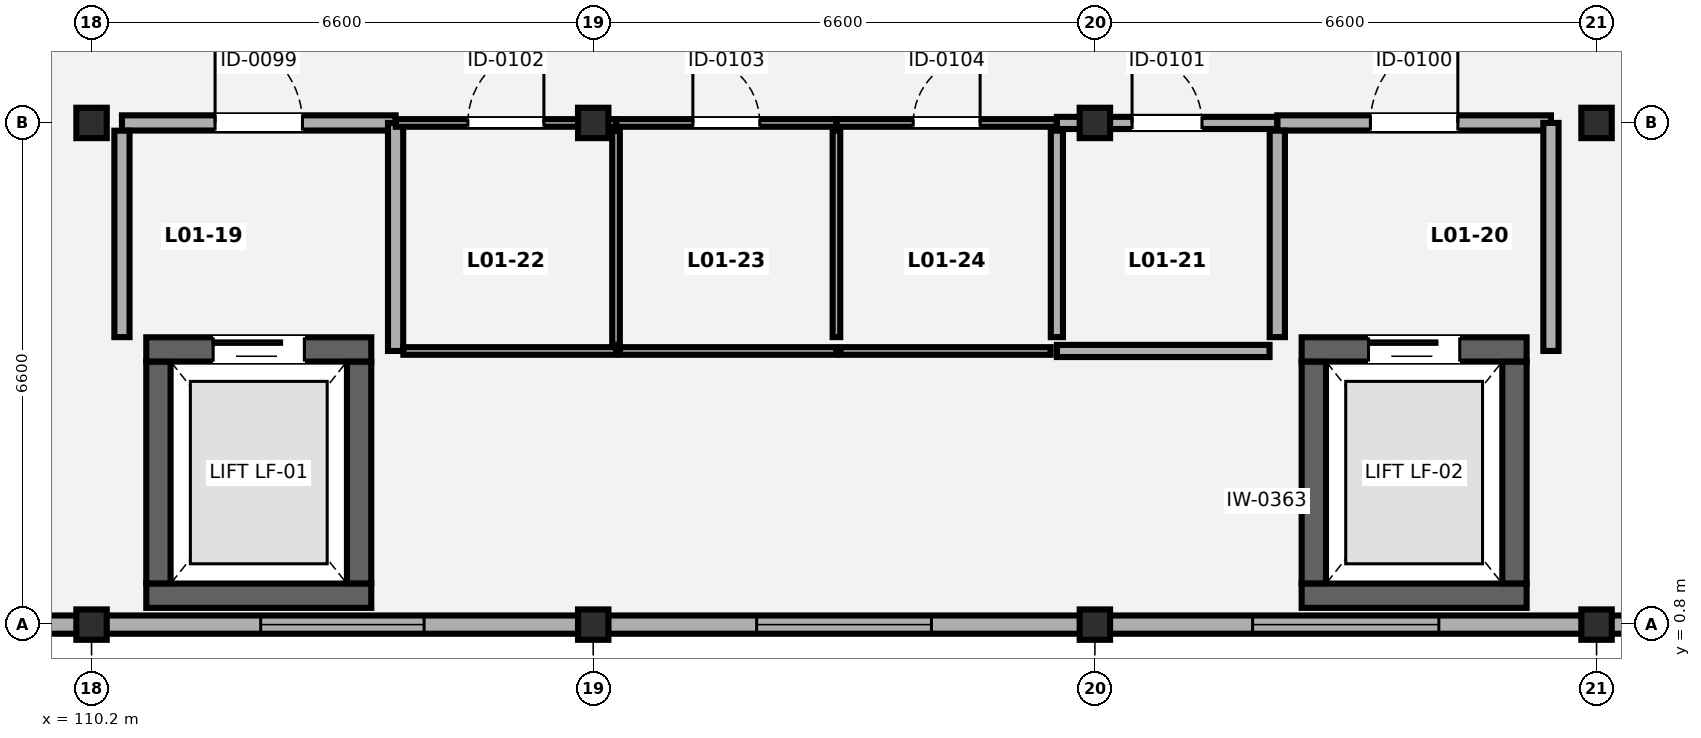
"""IFC4 building model, lengths in metres.
Left out: names, types, materials, properties, quantities, classifications, styles, units other than length and angle.
Written with IfcOpenShell. Run it as: python <this file> out.ifc"""

import sys

from ifc_helpers import new_model, si_unit, direction, frame, frame_2d, origin, origin_2d, place, context, subcontext, project, spatial, rectangle, i_section, extrude, element, fill, save


model = new_model("IFC4")
c1 = context("Model", 3, precision=1e-05, world=origin(), true_north=direction((0.0, 1.0)))
c2 = subcontext(c1, "Body", "Model", "MODEL_VIEW")
j1 = project(units=[si_unit("LENGTHUNIT", "METRE"), si_unit("PLANEANGLEUNIT", "RADIAN")], contexts=[c1])
p1 = place(None, origin())
s1 = spatial("IfcSite", under=j1, at=p1, CompositionType="ELEMENT")
p2 = place(p1, origin())
s2 = spatial("IfcBuilding", under=s1, at=p2, CompositionType="ELEMENT")
p3 = place(p2, frame((0.0, 0.0, 4.9)))
s3 = spatial("IfcBuildingStorey", under=s2, at=p3, CompositionType="ELEMENT", Elevation=4.9)
for number, where, z_axis, x_axis in (
    (1, (110.2, 0.8, 0.0), (0.0, 0.0, 1.0), (1.0, 0.0, 0.0)),
    (2, (110.2, 7.4, 0.0), (0.0, 0.0, 1.0), (1.0, 0.0, 0.0)),
    (3, (116.8, 0.8, 0.0), (0.0, 0.0, 1.0), (1.0, 0.0, 0.0)),
    (4, (116.8, 7.4, 0.0), (0.0, 0.0, 1.0), (1.0, 0.0, 0.0)),
    (5, (123.4, 0.8, 0.0), (0.0, 0.0, 1.0), (1.0, 0.0, 0.0)),
    (6, (123.4, 7.4, 0.0), (0.0, 0.0, 1.0), (1.0, 0.0, 0.0)),
    (7, (130.0, 0.8, 0.0), (0.0, 0.0, 1.0), (1.0, 0.0, 0.0)),
    (8, (130.0, 7.4, 0.0), (0.0, 0.0, 1.0), (1.0, 0.0, 0.0)),
):
    element("IfcColumn", number, at=place(p3, frame(where, z_axis=z_axis, x_axis=x_axis)), inside=s3, PredefinedType="COLUMN", context=c2, shape_type="SweptSolid", body=[
        extrude(i_section(OverallWidth=0.4, OverallDepth=0.4, WebThickness=0.02, FlangeThickness=0.035, FilletRadius=0.016, at=origin_2d()), origin(), (0.0, 0.0, 1.0), 4.2),
    ])
p4 = place(p3, frame((162.002, 0.8, 0.0), z_axis=(0.0, 0.0, 1.0), x_axis=(-1.0, 0.0, 0.0)))
e9 = element("IfcWall", 9, at=p4, inside=s3, PredefinedType="SOLIDWALL", context=c2, shape_type="SweptSolid", body=[
    extrude(rectangle(XDim=58.204, YDim=0.24, at=frame_2d((29.102, 0.0))), origin(), (0.0, 0.0, 1.0), 3.505),
])
p5 = place(p4, frame((54.102, 0.0, 0.85)))
e10 = element("IfcOpeningElement", 10, at=p5, cuts=e9, PredefinedType="OPENING", context=c2, shape_type="SweptSolid", body=[
    extrude(rectangle(XDim=2.0, YDim=1.4, at=frame_2d((1.0, 0.7))), frame((0.0, 0.13, 0.0), z_axis=(0.0, -1.0, 0.0), x_axis=(1.0, 0.0, 0.0)), (0.0, 0.0, 1.0), 0.26),
])
p6 = place(p4, frame((47.427, 0.0, 0.85)))
e11 = element("IfcOpeningElement", 11, at=p6, cuts=e9, PredefinedType="OPENING", context=c2, shape_type="SweptSolid", body=[
    extrude(rectangle(XDim=2.15, YDim=1.4, at=frame_2d((1.075, 0.7))), frame((0.0, 0.13, 0.0), z_axis=(0.0, -1.0, 0.0), x_axis=(1.0, 0.0, 0.0)), (0.0, 0.0, 1.0), 0.26),
])
p7 = place(p4, frame((40.752, 0.0, 0.85)))
e12 = element("IfcOpeningElement", 12, at=p7, cuts=e9, PredefinedType="OPENING", context=c2, shape_type="SweptSolid", body=[
    extrude(rectangle(XDim=2.3, YDim=1.4, at=frame_2d((1.15, 0.7))), frame((0.0, 0.13, 0.0), z_axis=(0.0, -1.0, 0.0), x_axis=(1.0, 0.0, 0.0)), (0.0, 0.0, 1.0), 0.26),
])
p8 = place(p4, frame((34.077, 0.0, 0.85)))
e13 = element("IfcOpeningElement", 13, at=p8, cuts=e9, PredefinedType="OPENING", context=c2, shape_type="SweptSolid", body=[
    extrude(rectangle(XDim=2.45, YDim=1.4, at=frame_2d((1.225, 0.7))), frame((0.0, 0.13, 0.0), z_axis=(0.0, -1.0, 0.0), x_axis=(1.0, 0.0, 0.0)), (0.0, 0.0, 1.0), 0.26),
])
p9 = place(p4, frame((28.102, 0.0, 0.85)))
e14 = element("IfcOpeningElement", 14, at=p9, cuts=e9, PredefinedType="OPENING", context=c2, shape_type="SweptSolid", body=[
    extrude(rectangle(XDim=1.2, YDim=1.25, at=frame_2d((0.6, 0.625))), frame((0.0, 0.13, 0.0), z_axis=(0.0, -1.0, 0.0), x_axis=(1.0, 0.0, 0.0)), (0.0, 0.0, 1.0), 0.26),
])
p10 = place(p4, frame((21.377, 0.0, 0.85)))
e15 = element("IfcOpeningElement", 15, at=p10, cuts=e9, PredefinedType="OPENING", context=c2, shape_type="SweptSolid", body=[
    extrude(rectangle(XDim=1.45, YDim=1.25, at=frame_2d((0.725, 0.625))), frame((0.0, 0.13, 0.0), z_axis=(0.0, -1.0, 0.0), x_axis=(1.0, 0.0, 0.0)), (0.0, 0.0, 1.0), 0.26),
])
p11 = place(p4, frame((14.677, 0.0, 0.85)))
e16 = element("IfcOpeningElement", 16, at=p11, cuts=e9, PredefinedType="OPENING", context=c2, shape_type="SweptSolid", body=[
    extrude(rectangle(XDim=1.65, YDim=1.25, at=frame_2d((0.825, 0.625))), frame((0.0, 0.13, 0.0), z_axis=(0.0, -1.0, 0.0), x_axis=(1.0, 0.0, 0.0)), (0.0, 0.0, 1.0), 0.26),
])
p12 = place(p4, frame((7.952, 0.0, 0.85)))
e17 = element("IfcOpeningElement", 17, at=p12, cuts=e9, PredefinedType="OPENING", context=c2, shape_type="SweptSolid", body=[
    extrude(rectangle(XDim=1.9, YDim=1.25, at=frame_2d((0.95, 0.625))), frame((0.0, 0.13, 0.0), z_axis=(0.0, -1.0, 0.0), x_axis=(1.0, 0.0, 0.0)), (0.0, 0.0, 1.0), 0.26),
])
p13 = place(p4, frame((1.602, 0.0, 0.85)))
e18 = element("IfcOpeningElement", 18, at=p13, cuts=e9, PredefinedType="OPENING", context=c2, shape_type="SweptSolid", body=[
    extrude(rectangle(XDim=2.2, YDim=1.25, at=frame_2d((1.1, 0.625))), frame((0.0, 0.13, 0.0), z_axis=(0.0, -1.0, 0.0), x_axis=(1.0, 0.0, 0.0)), (0.0, 0.0, 1.0), 0.26),
])
p14 = place(p3, frame((110.92, 1.18, 0.0), z_axis=(0.0, 0.0, 1.0), x_axis=(1.0, 0.0, 0.0)))
e19 = element("IfcWall", 19, at=p14, inside=s3, PredefinedType="SHEAR", context=c2, shape_type="SweptSolid", body=[
    extrude(rectangle(XDim=2.96, YDim=0.32, at=frame_2d((1.48, 0.0))), origin(), (0.0, 0.0, 1.0), 4.02),
])
p15 = place(p3, frame((110.92, 4.42, 0.0), z_axis=(0.0, 0.0, 1.0), x_axis=(1.0, 0.0, 0.0)))
e20 = element("IfcWall", 20, at=p15, inside=s3, PredefinedType="SHEAR", context=c2, shape_type="SweptSolid", body=[
    extrude(rectangle(XDim=2.96, YDim=0.32, at=frame_2d((1.48, 0.0))), origin(), (0.0, 0.0, 1.0), 4.02),
])
p16 = place(p15, frame((0.88, 0.0, 0.0)))
e21 = element("IfcOpeningElement", 21, at=p16, cuts=e20, PredefinedType="OPENING", context=c2, shape_type="SweptSolid", body=[
    extrude(rectangle(XDim=1.2, YDim=2.2, at=frame_2d((0.6, 1.1))), frame((0.0, 0.17, 0.0), z_axis=(0.0, -1.0, 0.0), x_axis=(1.0, 0.0, 0.0)), (0.0, 0.0, 1.0), 0.34),
])
for number, where, z_axis, x_axis in (
    (22, (111.08, 1.342, 0.0), (0.0, 0.0, 1.0), (0.0, 1.0, 0.0)),
    (23, (113.72, 1.342, 0.0), (0.0, 0.0, 1.0), (0.0, 1.0, 0.0)),
):
    element("IfcWall", number, at=place(p3, frame(where, z_axis=z_axis, x_axis=x_axis)), inside=s3, PredefinedType="SHEAR", context=c2, shape_type="SweptSolid", body=[
        extrude(rectangle(XDim=2.916, YDim=0.32, at=frame_2d((1.458, 0.0))), origin(), (0.0, 0.0, 1.0), 4.02),
    ])
p17 = place(p3, frame((126.12, 1.18, 0.0), z_axis=(0.0, 0.0, 1.0), x_axis=(1.0, 0.0, 0.0)))
e24 = element("IfcWall", 24, at=p17, inside=s3, PredefinedType="SHEAR", context=c2, shape_type="SweptSolid", body=[
    extrude(rectangle(XDim=2.96, YDim=0.32, at=frame_2d((1.48, 0.0))), origin(), (0.0, 0.0, 1.0), 4.02),
])
p18 = place(p3, frame((126.12, 4.42, 0.0), z_axis=(0.0, 0.0, 1.0), x_axis=(1.0, 0.0, 0.0)))
e25 = element("IfcWall", 25, at=p18, inside=s3, PredefinedType="SHEAR", context=c2, shape_type="SweptSolid", body=[
    extrude(rectangle(XDim=2.96, YDim=0.32, at=frame_2d((1.48, 0.0))), origin(), (0.0, 0.0, 1.0), 4.02),
])
p19 = place(p18, frame((0.88, 0.0, 0.0)))
e26 = element("IfcOpeningElement", 26, at=p19, cuts=e25, PredefinedType="OPENING", context=c2, shape_type="SweptSolid", body=[
    extrude(rectangle(XDim=1.2, YDim=2.2, at=frame_2d((0.6, 1.1))), frame((0.0, 0.17, 0.0), z_axis=(0.0, -1.0, 0.0), x_axis=(1.0, 0.0, 0.0)), (0.0, 0.0, 1.0), 0.34),
])
for number, where, z_axis, x_axis in (
    (27, (126.28, 1.342, 0.0), (0.0, 0.0, 1.0), (0.0, 1.0, 0.0)),
    (28, (128.92, 1.342, 0.0), (0.0, 0.0, 1.0), (0.0, 1.0, 0.0)),
):
    element("IfcWall", number, at=place(p3, frame(where, z_axis=z_axis, x_axis=x_axis)), inside=s3, PredefinedType="SHEAR", context=c2, shape_type="SweptSolid", body=[
        extrude(rectangle(XDim=2.916, YDim=0.32, at=frame_2d((1.458, 0.0))), origin(), (0.0, 0.0, 1.0), 4.02),
    ])
p20 = place(p3, frame((110.6, 7.4, 0.0), z_axis=(0.0, 0.0, 1.0), x_axis=(1.0, 0.0, 0.0)))
e29 = element("IfcWall", 29, at=p20, inside=s3, PredefinedType="SOLIDWALL", context=c2, shape_type="SweptSolid", body=[
    extrude(rectangle(XDim=3.6, YDim=0.2, at=frame_2d((1.8, 0.0))), origin(), (0.0, 0.0, 1.0), 3.293),
])
p21 = place(p20, frame((1.225, 0.0, 0.0)))
e30 = element("IfcOpeningElement", 30, at=p21, cuts=e29, PredefinedType="OPENING", context=c2, shape_type="SweptSolid", body=[
    extrude(rectangle(XDim=1.15, YDim=2.15, at=frame_2d((0.575, 1.075))), frame((0.0, 0.11, 0.0), z_axis=(0.0, -1.0, 0.0), x_axis=(1.0, 0.0, 0.0)), (0.0, 0.0, 1.0), 0.22),
])
p22 = place(p3, frame((110.6, 4.582, 0.0), z_axis=(0.0, 0.0, 1.0), x_axis=(0.0, 1.0, 0.0)))
e31 = element("IfcWall", 31, at=p22, inside=s3, PredefinedType="SOLIDWALL", context=c2, shape_type="SweptSolid", body=[
    extrude(rectangle(XDim=2.716, YDim=0.2, at=frame_2d((1.358, 0.0))), origin(), (0.0, 0.0, 1.0), 4.02),
])
p23 = place(p3, frame((114.2, 4.4, 0.0), z_axis=(0.0, 0.0, 1.0), x_axis=(0.0, 1.0, 0.0)))
e32 = element("IfcWall", 32, at=p23, inside=s3, PredefinedType="SOLIDWALL", context=c2, shape_type="SweptSolid", body=[
    extrude(rectangle(XDim=3.0, YDim=0.2, at=frame_2d((1.5, 0.0))), origin(), (0.0, 0.0, 1.0), 4.02),
])
p24 = place(p3, frame((125.8, 7.4, 0.0), z_axis=(0.0, 0.0, 1.0), x_axis=(1.0, 0.0, 0.0)))
e33 = element("IfcWall", 33, at=p24, inside=s3, PredefinedType="SOLIDWALL", context=c2, shape_type="SweptSolid", body=[
    extrude(rectangle(XDim=3.6, YDim=0.2, at=frame_2d((1.8, 0.0))), origin(), (0.0, 0.0, 1.0), 3.293),
])
p25 = place(p24, frame((1.225, 0.0, 0.0)))
e34 = element("IfcOpeningElement", 34, at=p25, cuts=e33, PredefinedType="OPENING", context=c2, shape_type="SweptSolid", body=[
    extrude(rectangle(XDim=1.15, YDim=2.15, at=frame_2d((0.575, 1.075))), frame((0.0, 0.11, 0.0), z_axis=(0.0, -1.0, 0.0), x_axis=(1.0, 0.0, 0.0)), (0.0, 0.0, 1.0), 0.22),
])
p26 = place(p3, frame((125.8, 4.582, 0.0), z_axis=(0.0, 0.0, 1.0), x_axis=(0.0, 1.0, 0.0)))
e35 = element("IfcWall", 35, at=p26, inside=s3, PredefinedType="SOLIDWALL", context=c2, shape_type="SweptSolid", body=[
    extrude(rectangle(XDim=2.716, YDim=0.2, at=frame_2d((1.358, 0.0))), origin(), (0.0, 0.0, 1.0), 4.02),
])
p27 = place(p3, frame((129.4, 4.4, 0.0), z_axis=(0.0, 0.0, 1.0), x_axis=(0.0, 1.0, 0.0)))
e36 = element("IfcWall", 36, at=p27, inside=s3, PredefinedType="SOLIDWALL", context=c2, shape_type="SweptSolid", body=[
    extrude(rectangle(XDim=3.0, YDim=0.2, at=frame_2d((1.5, 0.0))), origin(), (0.0, 0.0, 1.0), 4.02),
])
p28 = place(p3, frame((122.9, 4.4, 0.0), z_axis=(0.0, 0.0, 1.0), x_axis=(1.0, 0.0, 0.0)))
e37 = element("IfcWall", 37, at=p28, inside=s3, PredefinedType="PARTITIONING", context=c2, shape_type="SweptSolid", body=[
    extrude(rectangle(XDim=2.798, YDim=0.16, at=frame_2d((1.399, 0.0))), origin(), (0.0, 0.0, 1.0), 3.546),
])
p29 = place(p3, frame((122.9, 7.4, 0.0), z_axis=(0.0, 0.0, 1.0), x_axis=(1.0, 0.0, 0.0)))
e38 = element("IfcWall", 38, at=p29, inside=s3, PredefinedType="PARTITIONING", context=c2, shape_type="SweptSolid", body=[
    extrude(rectangle(XDim=2.898, YDim=0.16, at=frame_2d((1.449, 0.0))), origin(), (0.0, 0.0, 1.0), 3.293),
])
p30 = place(p29, frame((0.989, 0.0, 0.0)))
e39 = element("IfcOpeningElement", 39, at=p30, cuts=e38, PredefinedType="OPENING", context=c2, shape_type="SweptSolid", body=[
    extrude(rectangle(XDim=0.92, YDim=2.12, at=frame_2d((0.46, 1.06))), frame((0.0, 0.09, 0.0), z_axis=(0.0, -1.0, 0.0), x_axis=(1.0, 0.0, 0.0)), (0.0, 0.0, 1.0), 0.18),
])
p31 = place(p3, frame((122.9, 4.582, 0.0), z_axis=(0.0, 0.0, 1.0), x_axis=(0.0, 1.0, 0.0)))
e40 = element("IfcWall", 40, at=p31, inside=s3, PredefinedType="PARTITIONING", context=c2, shape_type="SweptSolid", body=[
    extrude(rectangle(XDim=2.716, YDim=0.16, at=frame_2d((1.358, 0.0))), origin(), (0.0, 0.0, 1.0), 4.02),
])
p32 = place(p3, frame((114.302, 4.4, 0.0), z_axis=(0.0, 0.0, 1.0), x_axis=(1.0, 0.0, 0.0)))
e41 = element("IfcWall", 41, at=p32, inside=s3, PredefinedType="PARTITIONING", context=c2, shape_type="SweptSolid", body=[
    extrude(rectangle(XDim=2.798, YDim=0.1, at=frame_2d((1.399, 0.0))), origin(), (0.0, 0.0, 1.0), 4.02),
])
p33 = place(p3, frame((114.202, 7.4, 0.0), z_axis=(0.0, 0.0, 1.0), x_axis=(1.0, 0.0, 0.0)))
e42 = element("IfcWall", 42, at=p33, inside=s3, PredefinedType="PARTITIONING", context=c2, shape_type="SweptSolid", body=[
    extrude(rectangle(XDim=2.898, YDim=0.1, at=frame_2d((1.449, 0.0))), origin(), (0.0, 0.0, 1.0), 3.293),
])
p34 = place(p33, frame((0.949, 0.0, 0.0)))
e43 = element("IfcOpeningElement", 43, at=p34, cuts=e42, PredefinedType="OPENING", context=c2, shape_type="SweptSolid", body=[
    extrude(rectangle(XDim=1.0, YDim=2.1, at=frame_2d((0.5, 1.05))), frame((0.0, 0.06, 0.0), z_axis=(0.0, -1.0, 0.0), x_axis=(1.0, 0.0, 0.0)), (0.0, 0.0, 1.0), 0.12),
])
p35 = place(p3, frame((117.1, 4.482, 0.0), z_axis=(0.0, 0.0, 1.0), x_axis=(0.0, 1.0, 0.0)))
e44 = element("IfcWall", 44, at=p35, inside=s3, PredefinedType="PARTITIONING", context=c2, shape_type="SweptSolid", body=[
    extrude(rectangle(XDim=2.816, YDim=0.1, at=frame_2d((1.408, 0.0))), origin(), (0.0, 0.0, 1.0), 4.02),
])
p36 = place(p3, frame((117.152, 4.4, 0.0), z_axis=(0.0, 0.0, 1.0), x_axis=(1.0, 0.0, 0.0)))
e45 = element("IfcWall", 45, at=p36, inside=s3, PredefinedType="PARTITIONING", context=c2, shape_type="SweptSolid", body=[
    extrude(rectangle(XDim=2.848, YDim=0.1, at=frame_2d((1.424, 0.0))), origin(), (0.0, 0.0, 1.0), 4.02),
])
p37 = place(p3, frame((117.102, 7.4, 0.0), z_axis=(0.0, 0.0, 1.0), x_axis=(1.0, 0.0, 0.0)))
e46 = element("IfcWall", 46, at=p37, inside=s3, PredefinedType="PARTITIONING", context=c2, shape_type="SweptSolid", body=[
    extrude(rectangle(XDim=2.898, YDim=0.1, at=frame_2d((1.449, 0.0))), origin(), (0.0, 0.0, 1.0), 3.293),
])
p38 = place(p37, frame((1.009, 0.0, 0.0)))
e47 = element("IfcOpeningElement", 47, at=p38, cuts=e46, PredefinedType="OPENING", context=c2, shape_type="SweptSolid", body=[
    extrude(rectangle(XDim=0.88, YDim=2.08, at=frame_2d((0.44, 1.04))), frame((0.0, 0.06, 0.0), z_axis=(0.0, -1.0, 0.0), x_axis=(1.0, 0.0, 0.0)), (0.0, 0.0, 1.0), 0.12),
])
p39 = place(p3, frame((120.0, 4.582, 0.0), z_axis=(0.0, 0.0, 1.0), x_axis=(0.0, 1.0, 0.0)))
e48 = element("IfcWall", 48, at=p39, inside=s3, PredefinedType="PARTITIONING", context=c2, shape_type="SweptSolid", body=[
    extrude(rectangle(XDim=2.716, YDim=0.1, at=frame_2d((1.358, 0.0))), origin(), (0.0, 0.0, 1.0), 4.02),
])
p40 = place(p3, frame((120.052, 4.4, 0.0), z_axis=(0.0, 0.0, 1.0), x_axis=(1.0, 0.0, 0.0)))
e49 = element("IfcWall", 49, at=p40, inside=s3, PredefinedType="PARTITIONING", context=c2, shape_type="SweptSolid", body=[
    extrude(rectangle(XDim=2.766, YDim=0.1, at=frame_2d((1.383, 0.0))), origin(), (0.0, 0.0, 1.0), 4.02),
])
p41 = place(p3, frame((120.002, 7.4, 0.0), z_axis=(0.0, 0.0, 1.0), x_axis=(1.0, 0.0, 0.0)))
e50 = element("IfcWall", 50, at=p41, inside=s3, PredefinedType="PARTITIONING", context=c2, shape_type="SweptSolid", body=[
    extrude(rectangle(XDim=2.896, YDim=0.1, at=frame_2d((1.448, 0.0))), origin(), (0.0, 0.0, 1.0), 3.293),
])
p42 = place(p41, frame((1.008, 0.0, 0.0)))
e51 = element("IfcOpeningElement", 51, at=p42, cuts=e50, PredefinedType="OPENING", context=c2, shape_type="SweptSolid", body=[
    extrude(rectangle(XDim=0.88, YDim=2.08, at=frame_2d((0.44, 1.04))), frame((0.0, 0.06, 0.0), z_axis=(0.0, -1.0, 0.0), x_axis=(1.0, 0.0, 0.0)), (0.0, 0.0, 1.0), 0.12),
])
p43 = place(p6, origin())
e52 = element("IfcWindow", 52, at=p43, inside=s3, PartitioningType="SINGLE_PANEL", PredefinedType="WINDOW", context=c2, shape_type="SweptSolid", body=[
    extrude(rectangle(XDim=2.15, YDim=1.4, at=frame_2d((1.075, 0.7))), frame((0.0, 0.03, 0.0), z_axis=(0.0, -1.0, 0.0), x_axis=(1.0, 0.0, 0.0)), (0.0, 0.0, 1.0), 0.06),
])
fill(e11, e52)
p44 = place(p7, origin())
e53 = element("IfcWindow", 53, at=p44, inside=s3, PartitioningType="SINGLE_PANEL", PredefinedType="WINDOW", context=c2, shape_type="SweptSolid", body=[
    extrude(rectangle(XDim=2.3, YDim=1.4, at=frame_2d((1.15, 0.7))), frame((0.0, 0.03, 0.0), z_axis=(0.0, -1.0, 0.0), x_axis=(1.0, 0.0, 0.0)), (0.0, 0.0, 1.0), 0.06),
])
fill(e12, e53)
p45 = place(p8, origin())
e54 = element("IfcWindow", 54, at=p45, inside=s3, PartitioningType="SINGLE_PANEL", PredefinedType="WINDOW", context=c2, shape_type="SweptSolid", body=[
    extrude(rectangle(XDim=2.45, YDim=1.4, at=frame_2d((1.225, 0.7))), frame((0.0, 0.03, 0.0), z_axis=(0.0, -1.0, 0.0), x_axis=(1.0, 0.0, 0.0)), (0.0, 0.0, 1.0), 0.06),
])
fill(e13, e54)
p46 = place(p16, origin())
e55 = element("IfcDoor", 55, at=p46, inside=s3, OperationType="SLIDING_TO_LEFT", PredefinedType="DOOR", context=c2, shape_type="SweptSolid", body=[
    extrude(rectangle(XDim=1.2, YDim=2.2, at=frame_2d((0.6, 1.1))), frame((0.0, 0.025, 0.0), z_axis=(0.0, -1.0, 0.0), x_axis=(1.0, 0.0, 0.0)), (0.0, 0.0, 1.0), 0.05),
])
fill(e21, e55)
p47 = place(p19, origin())
e56 = element("IfcDoor", 56, at=p47, inside=s3, OperationType="SLIDING_TO_LEFT", PredefinedType="DOOR", context=c2, shape_type="SweptSolid", body=[
    extrude(rectangle(XDim=1.2, YDim=2.2, at=frame_2d((0.6, 1.1))), frame((0.0, 0.025, 0.0), z_axis=(0.0, -1.0, 0.0), x_axis=(1.0, 0.0, 0.0)), (0.0, 0.0, 1.0), 0.05),
])
fill(e26, e56)
p48 = place(p21, origin())
e57 = element("IfcDoor", 57, at=p48, inside=s3, OperationType="SINGLE_SWING_LEFT", PredefinedType="DOOR", context=c2, shape_type="SweptSolid", body=[
    extrude(rectangle(XDim=1.15, YDim=2.15, at=frame_2d((0.575, 1.075))), frame((0.0, 0.025, 0.0), z_axis=(0.0, -1.0, 0.0), x_axis=(1.0, 0.0, 0.0)), (0.0, 0.0, 1.0), 0.05),
])
fill(e30, e57)
p49 = place(p25, origin())
e58 = element("IfcDoor", 58, at=p49, inside=s3, OperationType="SINGLE_SWING_RIGHT", PredefinedType="DOOR", context=c2, shape_type="SweptSolid", body=[
    extrude(rectangle(XDim=1.15, YDim=2.15, at=frame_2d((0.575, 1.075))), frame((0.0, 0.025, 0.0), z_axis=(0.0, -1.0, 0.0), x_axis=(1.0, 0.0, 0.0)), (0.0, 0.0, 1.0), 0.05),
])
fill(e34, e58)
p50 = place(p30, origin())
e59 = element("IfcDoor", 59, at=p50, inside=s3, OperationType="SINGLE_SWING_LEFT", PredefinedType="DOOR", context=c2, shape_type="SweptSolid", body=[
    extrude(rectangle(XDim=0.92, YDim=2.12, at=frame_2d((0.46, 1.06))), frame((0.0, 0.025, 0.0), z_axis=(0.0, -1.0, 0.0), x_axis=(1.0, 0.0, 0.0)), (0.0, 0.0, 1.0), 0.05),
])
fill(e39, e59)
p51 = place(p34, origin())
e60 = element("IfcDoor", 60, at=p51, inside=s3, OperationType="SINGLE_SWING_RIGHT", PredefinedType="DOOR", context=c2, shape_type="SweptSolid", body=[
    extrude(rectangle(XDim=1.0, YDim=2.1, at=frame_2d((0.5, 1.05))), frame((0.0, 0.025, 0.0), z_axis=(0.0, -1.0, 0.0), x_axis=(1.0, 0.0, 0.0)), (0.0, 0.0, 1.0), 0.05),
])
fill(e43, e60)
p52 = place(p38, origin())
e61 = element("IfcDoor", 61, at=p52, inside=s3, OperationType="SINGLE_SWING_LEFT", PredefinedType="DOOR", context=c2, shape_type="SweptSolid", body=[
    extrude(rectangle(XDim=0.88, YDim=2.08, at=frame_2d((0.44, 1.04))), frame((0.0, 0.025, 0.0), z_axis=(0.0, -1.0, 0.0), x_axis=(1.0, 0.0, 0.0)), (0.0, 0.0, 1.0), 0.05),
])
fill(e47, e61)
p53 = place(p42, origin())
e62 = element("IfcDoor", 62, at=p53, inside=s3, OperationType="SINGLE_SWING_RIGHT", PredefinedType="DOOR", context=c2, shape_type="SweptSolid", body=[
    extrude(rectangle(XDim=0.88, YDim=2.08, at=frame_2d((0.44, 1.04))), frame((0.0, 0.025, 0.0), z_axis=(0.0, -1.0, 0.0), x_axis=(1.0, 0.0, 0.0)), (0.0, 0.0, 1.0), 0.05),
])
fill(e51, e62)
save(model, sys.argv[1])
